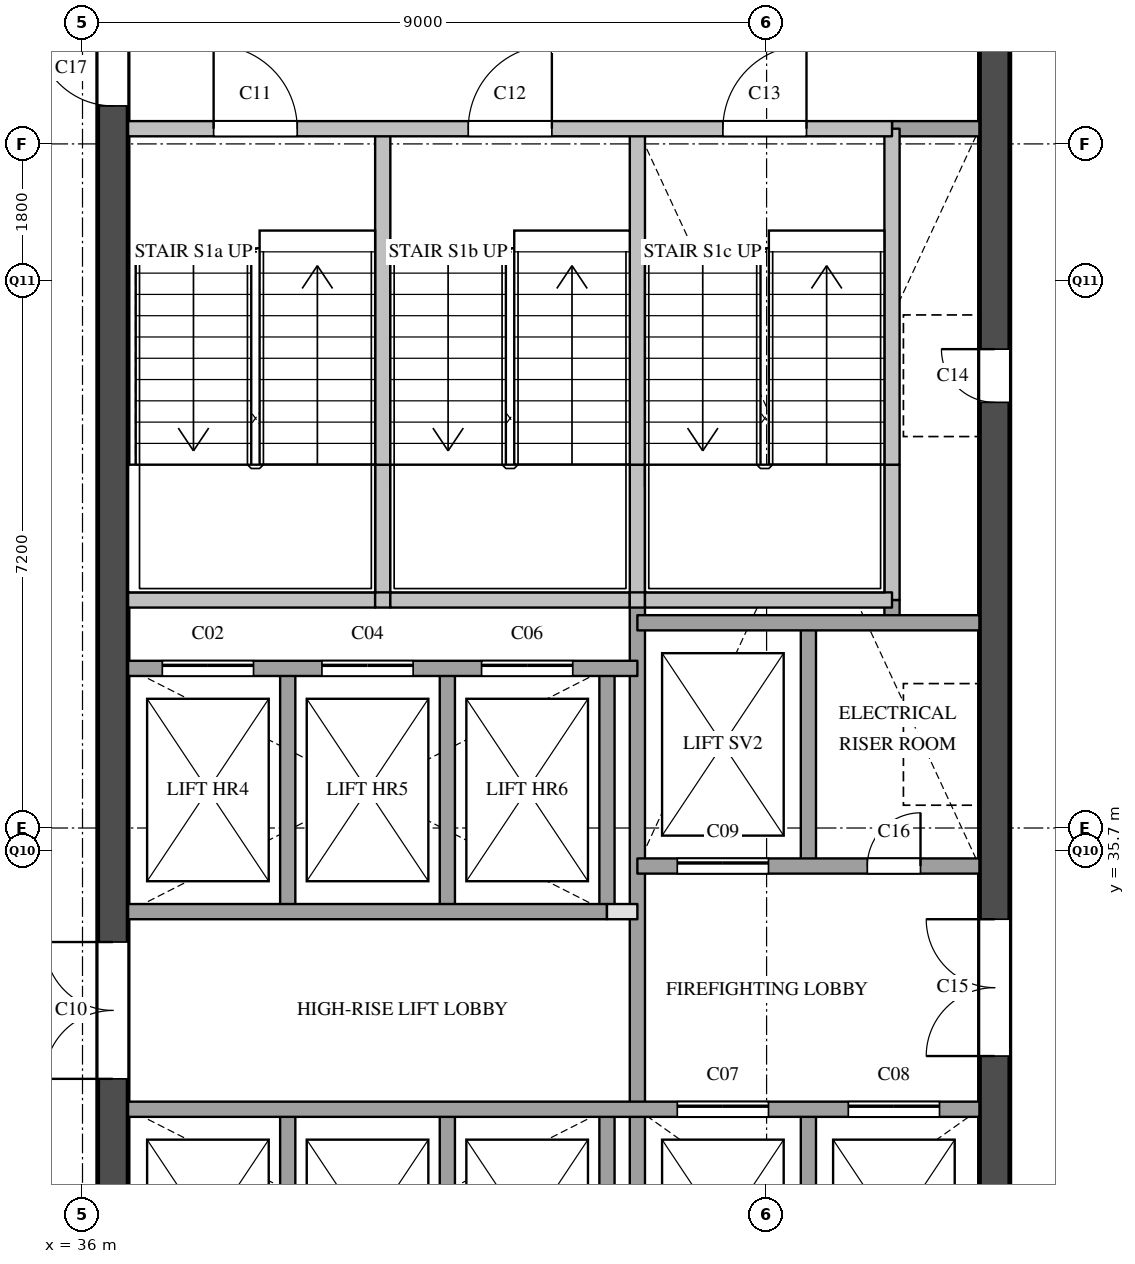
"""IFC4 building model, lengths in metres.
Left out: names, types, materials, properties, quantities, classifications, styles, units other than length and angle.
Written with IfcOpenShell. Run it as: python <this file> out.ifc"""

import sys

from ifc_helpers import new_model, si_unit, direction, frame, frame_2d, origin, place, context, subcontext, project, spatial, rectangle, extrude, element, fill, save


model = new_model("IFC4")
c1 = context("Model", 3, precision=1e-05, world=origin(), true_north=direction((0.0, 1.0)))
c2 = subcontext(c1, "Body", "Model", "MODEL_VIEW")
j1 = project(units=[si_unit("LENGTHUNIT", "METRE"), si_unit("PLANEANGLEUNIT", "RADIAN")], contexts=[c1])
p1 = place(None, origin())
s1 = spatial("IfcSite", under=j1, at=p1, CompositionType="ELEMENT")
p2 = place(p1, origin())
s2 = spatial("IfcBuilding", under=s1, at=p2, CompositionType="ELEMENT")
p3 = place(p2, frame((0.0, 0.0, 261.8)))
s3 = spatial("IfcBuildingStorey", under=s2, at=p3, CompositionType="ELEMENT", Elevation=261.8)
p4 = place(p3, frame((36.4, 29.1, 0.0), z_axis=(0.0, 0.0, 1.0), x_axis=(0.0, 1.0, 0.0)))
e1 = element("IfcWall", 1, at=p4, inside=s3, PredefinedType="SHEAR", context=c2, shape_type="SweptSolid", body=[
    extrude(rectangle(XDim=20.3, YDim=0.4, at=frame_2d((10.15, 0.0))), origin(), (0.0, 0.0, 1.0), 3.6),
])
p5 = place(p4, frame((3.6, 0.0, 0.0)))
e2 = element("IfcOpeningElement", 2, at=p5, cuts=e1, PredefinedType="OPENING", context=c2, shape_type="SweptSolid", body=[
    extrude(rectangle(XDim=1.8, YDim=2.1, at=frame_2d((0.9, 1.05))), frame((0.0, 0.21, 0.0), z_axis=(0.0, -1.0, 0.0), x_axis=(1.0, 0.0, 0.0)), (0.0, 0.0, 1.0), 0.42),
])
p6 = place(p4, frame((16.4, 0.0, 0.0)))
e3 = element("IfcOpeningElement", 3, at=p6, cuts=e1, PredefinedType="OPENING", context=c2, shape_type="SweptSolid", body=[
    extrude(rectangle(XDim=1.0, YDim=2.1, at=frame_2d((0.5, 1.05))), frame((0.0, 0.21, 0.0), z_axis=(0.0, -1.0, 0.0), x_axis=(1.0, 0.0, 0.0)), (0.0, 0.0, 1.0), 0.42),
])
p7 = place(p3, frame((48.0, 29.1, 0.0), z_axis=(0.0, 0.0, 1.0), x_axis=(0.0, 1.0, 0.0)))
e4 = element("IfcWall", 4, at=p7, inside=s3, PredefinedType="SHEAR", context=c2, shape_type="SweptSolid", body=[
    extrude(rectangle(XDim=20.3, YDim=0.4, at=frame_2d((10.15, 0.0))), origin(), (0.0, 0.0, 1.0), 3.6),
])
p8 = place(p7, frame((12.5, 0.0, 0.0)))
e5 = element("IfcOpeningElement", 5, at=p8, cuts=e4, PredefinedType="OPENING", context=c2, shape_type="SweptSolid", body=[
    extrude(rectangle(XDim=0.7, YDim=2.1, at=frame_2d((0.35, 1.05))), frame((0.0, 0.21, 0.0), z_axis=(0.0, -1.0, 0.0), x_axis=(1.0, 0.0, 0.0)), (0.0, 0.0, 1.0), 0.42),
])
p9 = place(p7, frame((3.9, 0.0, 0.0)))
e6 = element("IfcOpeningElement", 6, at=p9, cuts=e4, PredefinedType="OPENING", context=c2, shape_type="SweptSolid", body=[
    extrude(rectangle(XDim=1.8, YDim=2.1, at=frame_2d((0.9, 1.05))), frame((0.0, 0.21, 0.0), z_axis=(0.0, -1.0, 0.0), x_axis=(1.0, 0.0, 0.0)), (0.0, 0.0, 1.0), 0.42),
])
p10 = place(p3, frame((38.7, 29.1, 0.0), z_axis=(0.0, 0.0, 1.0), x_axis=(0.0, 1.0, 0.0)))
e7 = element("IfcWall", 7, at=p10, inside=s3, PredefinedType="SOLIDWALL", context=c2, shape_type="SweptSolid", body=[
    extrude(rectangle(XDim=3.2, YDim=0.2, at=frame_2d((1.6, 0.0))), origin(), (0.0, 0.0, 1.0), 3.6),
])
p11 = place(p3, frame((38.7, 34.9, 0.0), z_axis=(0.0, 0.0, 1.0), x_axis=(0.0, 1.0, 0.0)))
e8 = element("IfcWall", 8, at=p11, inside=s3, PredefinedType="SOLIDWALL", context=c2, shape_type="SweptSolid", body=[
    extrude(rectangle(XDim=3.2, YDim=0.2, at=frame_2d((1.6, 0.0))), origin(), (0.0, 0.0, 1.0), 3.6),
])
p12 = place(p3, frame((39.95, 39.0, 0.0), z_axis=(0.0, 0.0, 1.0), x_axis=(0.0, 1.0, 0.0)))
e9 = element("IfcWall", 9, at=p12, inside=s3, PredefinedType="SOLIDWALL", context=c2, shape_type="SweptSolid", body=[
    extrude(rectangle(XDim=1.78, YDim=0.2, at=frame_2d((0.89, 0.0))), origin(), (0.0, 0.0, 1.0), 3.6),
])
p13 = place(p3, frame((39.95, 40.78, 0.0), z_axis=(0.0, 0.0, 1.0), x_axis=(0.0, 1.0, 0.0)))
e10 = element("IfcWall", 10, at=p13, inside=s3, PredefinedType="SOLIDWALL", context=c2, shape_type="SweptSolid", body=[
    extrude(rectangle(XDim=4.42, YDim=0.2, at=frame_2d((2.21, 0.0))), origin(), (0.0, 0.0, 1.0), 3.6),
])
p14 = place(p3, frame((40.8, 29.1, 0.0), z_axis=(0.0, 0.0, 1.0), x_axis=(0.0, 1.0, 0.0)))
e11 = element("IfcWall", 11, at=p14, inside=s3, PredefinedType="SOLIDWALL", context=c2, shape_type="SweptSolid", body=[
    extrude(rectangle(XDim=3.2, YDim=0.2, at=frame_2d((1.6, 0.0))), origin(), (0.0, 0.0, 1.0), 3.6),
])
p15 = place(p3, frame((40.8, 34.9, 0.0), z_axis=(0.0, 0.0, 1.0), x_axis=(0.0, 1.0, 0.0)))
e12 = element("IfcWall", 12, at=p15, inside=s3, PredefinedType="SOLIDWALL", context=c2, shape_type="SweptSolid", body=[
    extrude(rectangle(XDim=3.2, YDim=0.2, at=frame_2d((1.6, 0.0))), origin(), (0.0, 0.0, 1.0), 3.6),
])
p16 = place(p3, frame((42.9, 29.1, 0.0), z_axis=(0.0, 0.0, 1.0), x_axis=(0.0, 1.0, 0.0)))
e13 = element("IfcWall", 13, at=p16, inside=s3, PredefinedType="SOLIDWALL", context=c2, shape_type="SweptSolid", body=[
    extrude(rectangle(XDim=3.2, YDim=0.2, at=frame_2d((1.6, 0.0))), origin(), (0.0, 0.0, 1.0), 3.6),
])
p17 = place(p3, frame((42.9, 34.9, 0.0), z_axis=(0.0, 0.0, 1.0), x_axis=(0.0, 1.0, 0.0)))
e14 = element("IfcWall", 14, at=p17, inside=s3, PredefinedType="SOLIDWALL", context=c2, shape_type="SweptSolid", body=[
    extrude(rectangle(XDim=3.2, YDim=0.2, at=frame_2d((1.6, 0.0))), origin(), (0.0, 0.0, 1.0), 3.6),
])
p18 = place(p3, frame((43.3, 29.1, 0.0), z_axis=(0.0, 0.0, 1.0), x_axis=(0.0, 1.0, 0.0)))
e15 = element("IfcWall", 15, at=p18, inside=s3, PredefinedType="SOLIDWALL", context=c2, shape_type="SweptSolid", body=[
    extrude(rectangle(XDim=9.9, YDim=0.2, at=frame_2d((4.95, 0.0))), origin(), (0.0, 0.0, 1.0), 3.6),
])
p19 = place(p3, frame((43.3, 39.0, 0.0), z_axis=(0.0, 0.0, 1.0), x_axis=(0.0, 1.0, 0.0)))
e16 = element("IfcWall", 16, at=p19, inside=s3, PredefinedType="SOLIDWALL", context=c2, shape_type="SweptSolid", body=[
    extrude(rectangle(XDim=1.78, YDim=0.2, at=frame_2d((0.89, 0.0))), origin(), (0.0, 0.0, 1.0), 3.6),
])
p20 = place(p3, frame((43.3, 40.78, 0.0), z_axis=(0.0, 0.0, 1.0), x_axis=(0.0, 1.0, 0.0)))
e17 = element("IfcWall", 17, at=p20, inside=s3, PredefinedType="SOLIDWALL", context=c2, shape_type="SweptSolid", body=[
    extrude(rectangle(XDim=4.42, YDim=0.2, at=frame_2d((2.21, 0.0))), origin(), (0.0, 0.0, 1.0), 3.6),
])
for number, where, z_axis, x_axis in (
    (18, (45.55, 29.1, 0.0), (0.0, 0.0, 1.0), (0.0, 1.0, 0.0)),
    (19, (45.55, 35.5, 0.0), (0.0, 0.0, 1.0), (0.0, 1.0, 0.0)),
):
    element("IfcWall", number, at=place(p3, frame(where, z_axis=z_axis, x_axis=x_axis)), inside=s3, PredefinedType="SOLIDWALL", context=c2, shape_type="SweptSolid", body=[
        extrude(rectangle(XDim=3.2, YDim=0.2, at=frame_2d((1.6, 0.0))), origin(), (0.0, 0.0, 1.0), 3.6),
    ])
p21 = place(p3, frame((46.65, 38.7, 0.0), z_axis=(0.0, 0.0, 1.0), x_axis=(0.0, 1.0, 0.0)))
e20 = element("IfcWall", 20, at=p21, inside=s3, PredefinedType="SOLIDWALL", context=c2, shape_type="SweptSolid", body=[
    extrude(rectangle(XDim=0.3, YDim=0.2, at=frame_2d((0.15, 0.0))), origin(), (0.0, 0.0, 1.0), 3.6),
])
p22 = place(p3, frame((46.65, 39.0, 0.0), z_axis=(0.0, 0.0, 1.0), x_axis=(0.0, 1.0, 0.0)))
e21 = element("IfcWall", 21, at=p22, inside=s3, PredefinedType="SOLIDWALL", context=c2, shape_type="SweptSolid", body=[
    extrude(rectangle(XDim=1.78, YDim=0.2, at=frame_2d((0.89, 0.0))), origin(), (0.0, 0.0, 1.0), 3.6),
])
p23 = place(p3, frame((46.65, 40.78, 0.0), z_axis=(0.0, 0.0, 1.0), x_axis=(0.0, 1.0, 0.0)))
e22 = element("IfcWall", 22, at=p23, inside=s3, PredefinedType="SOLIDWALL", context=c2, shape_type="SweptSolid", body=[
    extrude(rectangle(XDim=4.42, YDim=0.2, at=frame_2d((2.21, 0.0))), origin(), (0.0, 0.0, 1.0), 3.6),
])
p24 = place(p3, frame((36.6, 32.3, 0.0), z_axis=(0.0, 0.0, 1.0), x_axis=(1.0, 0.0, 0.0)))
e23 = element("IfcWall", 23, at=p24, inside=s3, PredefinedType="SOLIDWALL", context=c2, shape_type="SweptSolid", body=[
    extrude(rectangle(XDim=11.2, YDim=0.2, at=frame_2d((5.6, 0.0))), origin(), (0.0, 0.0, 1.0), 3.6),
])
p25 = place(p24, frame((7.225, 0.0, 0.0)))
e24 = element("IfcOpeningElement", 24, at=p25, cuts=e23, PredefinedType="OPENING", context=c2, shape_type="SweptSolid", body=[
    extrude(rectangle(XDim=1.2, YDim=2.1, at=frame_2d((0.6, 1.05))), frame((0.0, 0.11, 0.0), z_axis=(0.0, -1.0, 0.0), x_axis=(1.0, 0.0, 0.0)), (0.0, 0.0, 1.0), 0.22),
])
p26 = place(p24, frame((9.475, 0.0, 0.0)))
e25 = element("IfcOpeningElement", 25, at=p26, cuts=e23, PredefinedType="OPENING", context=c2, shape_type="SweptSolid", body=[
    extrude(rectangle(XDim=1.2, YDim=2.1, at=frame_2d((0.6, 1.05))), frame((0.0, 0.11, 0.0), z_axis=(0.0, -1.0, 0.0), x_axis=(1.0, 0.0, 0.0)), (0.0, 0.0, 1.0), 0.22),
])
p27 = place(p3, frame((42.9, 34.9, 0.0), z_axis=(0.0, 0.0, 1.0), x_axis=(1.0, 0.0, 0.0)))
e26 = element("IfcWall", 26, at=p27, inside=s3, PredefinedType="PARTITIONING", context=c2, shape_type="SweptSolid", body=[
    extrude(rectangle(XDim=0.4, YDim=0.2, at=frame_2d((0.2, 0.0))), origin(), (0.0, 0.0, 1.0), 3.6),
])
p28 = place(p3, frame((36.6, 34.9, 0.0), z_axis=(0.0, 0.0, 1.0), x_axis=(1.0, 0.0, 0.0)))
e27 = element("IfcWall", 27, at=p28, inside=s3, PredefinedType="SOLIDWALL", context=c2, shape_type="SweptSolid", body=[
    extrude(rectangle(XDim=6.3, YDim=0.2, at=frame_2d((3.15, 0.0))), origin(), (0.0, 0.0, 1.0), 3.6),
])
p29 = place(p3, frame((43.3, 35.5, 0.0), z_axis=(0.0, 0.0, 1.0), x_axis=(1.0, 0.0, 0.0)))
e28 = element("IfcWall", 28, at=p29, inside=s3, PredefinedType="SOLIDWALL", context=c2, shape_type="SweptSolid", body=[
    extrude(rectangle(XDim=4.5, YDim=0.2, at=frame_2d((2.25, 0.0))), origin(), (0.0, 0.0, 1.0), 3.6),
])
p30 = place(p29, frame((0.525, 0.0, 0.0)))
e29 = element("IfcOpeningElement", 29, at=p30, cuts=e28, PredefinedType="OPENING", context=c2, shape_type="SweptSolid", body=[
    extrude(rectangle(XDim=1.2, YDim=2.1, at=frame_2d((0.6, 1.05))), frame((0.0, 0.11, 0.0), z_axis=(0.0, -1.0, 0.0), x_axis=(1.0, 0.0, 0.0)), (0.0, 0.0, 1.0), 0.22),
])
p31 = place(p29, frame((3.025, 0.0, 0.0)))
e30 = element("IfcOpeningElement", 30, at=p31, cuts=e28, PredefinedType="OPENING", context=c2, shape_type="SweptSolid", body=[
    extrude(rectangle(XDim=0.7, YDim=2.1, at=frame_2d((0.35, 1.05))), frame((0.0, 0.11, 0.0), z_axis=(0.0, -1.0, 0.0), x_axis=(1.0, 0.0, 0.0)), (0.0, 0.0, 1.0), 0.22),
])
p32 = place(p3, frame((36.6, 38.1, 0.0), z_axis=(0.0, 0.0, 1.0), x_axis=(1.0, 0.0, 0.0)))
e31 = element("IfcWall", 31, at=p32, inside=s3, PredefinedType="SOLIDWALL", context=c2, shape_type="SweptSolid", body=[
    extrude(rectangle(XDim=6.7, YDim=0.2, at=frame_2d((3.35, 0.0))), origin(), (0.0, 0.0, 1.0), 3.6),
])
p33 = place(p32, frame((0.45, 0.0, 0.0)))
e32 = element("IfcOpeningElement", 32, at=p33, cuts=e31, PredefinedType="OPENING", context=c2, shape_type="SweptSolid", body=[
    extrude(rectangle(XDim=1.2, YDim=2.1, at=frame_2d((0.6, 1.05))), frame((0.0, 0.11, 0.0), z_axis=(0.0, -1.0, 0.0), x_axis=(1.0, 0.0, 0.0)), (0.0, 0.0, 1.0), 0.22),
])
p34 = place(p32, frame((2.55, 0.0, 0.0)))
e33 = element("IfcOpeningElement", 33, at=p34, cuts=e31, PredefinedType="OPENING", context=c2, shape_type="SweptSolid", body=[
    extrude(rectangle(XDim=1.2, YDim=2.1, at=frame_2d((0.6, 1.05))), frame((0.0, 0.11, 0.0), z_axis=(0.0, -1.0, 0.0), x_axis=(1.0, 0.0, 0.0)), (0.0, 0.0, 1.0), 0.22),
])
p35 = place(p32, frame((4.65, 0.0, 0.0)))
e34 = element("IfcOpeningElement", 34, at=p35, cuts=e31, PredefinedType="OPENING", context=c2, shape_type="SweptSolid", body=[
    extrude(rectangle(XDim=1.2, YDim=2.1, at=frame_2d((0.6, 1.05))), frame((0.0, 0.11, 0.0), z_axis=(0.0, -1.0, 0.0), x_axis=(1.0, 0.0, 0.0)), (0.0, 0.0, 1.0), 0.22),
])
p36 = place(p3, frame((43.3, 38.7, 0.0), z_axis=(0.0, 0.0, 1.0), x_axis=(1.0, 0.0, 0.0)))
e35 = element("IfcWall", 35, at=p36, inside=s3, PredefinedType="SOLIDWALL", context=c2, shape_type="SweptSolid", body=[
    extrude(rectangle(XDim=4.5, YDim=0.2, at=frame_2d((2.25, 0.0))), origin(), (0.0, 0.0, 1.0), 3.6),
])
p37 = place(p3, frame((36.6, 39.0, 0.0), z_axis=(0.0, 0.0, 1.0), x_axis=(1.0, 0.0, 0.0)))
e36 = element("IfcWall", 36, at=p37, inside=s3, PredefinedType="SOLIDWALL", context=c2, shape_type="SweptSolid", body=[
    extrude(rectangle(XDim=3.25, YDim=0.2, at=frame_2d((1.625, 0.0))), origin(), (0.0, 0.0, 1.0), 3.6),
])
p38 = place(p3, frame((39.85, 39.0, 0.0), z_axis=(0.0, 0.0, 1.0), x_axis=(1.0, 0.0, 0.0)))
e37 = element("IfcWall", 37, at=p38, inside=s3, PredefinedType="SOLIDWALL", context=c2, shape_type="SweptSolid", body=[
    extrude(rectangle(XDim=0.2, YDim=0.2, at=frame_2d((0.1, 0.0))), origin(), (0.0, 0.0, 1.0), 3.6),
])
p39 = place(p3, frame((40.05, 39.0, 0.0), z_axis=(0.0, 0.0, 1.0), x_axis=(1.0, 0.0, 0.0)))
e38 = element("IfcWall", 38, at=p39, inside=s3, PredefinedType="SOLIDWALL", context=c2, shape_type="SweptSolid", body=[
    extrude(rectangle(XDim=3.15, YDim=0.2, at=frame_2d((1.575, 0.0))), origin(), (0.0, 0.0, 1.0), 3.6),
])
p40 = place(p3, frame((43.2, 39.0, 0.0), z_axis=(0.0, 0.0, 1.0), x_axis=(1.0, 0.0, 0.0)))
e39 = element("IfcWall", 39, at=p40, inside=s3, PredefinedType="SOLIDWALL", context=c2, shape_type="SweptSolid", body=[
    extrude(rectangle(XDim=0.2, YDim=0.2, at=frame_2d((0.1, 0.0))), origin(), (0.0, 0.0, 1.0), 3.6),
])
p41 = place(p3, frame((43.4, 39.0, 0.0), z_axis=(0.0, 0.0, 1.0), x_axis=(1.0, 0.0, 0.0)))
e40 = element("IfcWall", 40, at=p41, inside=s3, PredefinedType="SOLIDWALL", context=c2, shape_type="SweptSolid", body=[
    extrude(rectangle(XDim=3.25, YDim=0.2, at=frame_2d((1.625, 0.0))), origin(), (0.0, 0.0, 1.0), 3.6),
])
p42 = place(p3, frame((46.65, 45.2, 0.0), z_axis=(0.0, 0.0, 1.0), x_axis=(1.0, 0.0, 0.0)))
e41 = element("IfcWall", 41, at=p42, inside=s3, PredefinedType="SOLIDWALL", context=c2, shape_type="SweptSolid", body=[
    extrude(rectangle(XDim=1.15, YDim=0.2, at=frame_2d((0.575, 0.0))), origin(), (0.0, 0.0, 1.0), 3.6),
])
p43 = place(p3, frame((36.6, 45.2, 0.0), z_axis=(0.0, 0.0, 1.0), x_axis=(1.0, 0.0, 0.0)))
e42 = element("IfcWall", 42, at=p43, inside=s3, PredefinedType="SOLIDWALL", context=c2, shape_type="SweptSolid", body=[
    extrude(rectangle(XDim=10.05, YDim=0.2, at=frame_2d((5.025, 0.0))), origin(), (0.0, 0.0, 1.0), 3.6),
])
p44 = place(p43, frame((1.125, 0.0, 0.0)))
e43 = element("IfcOpeningElement", 43, at=p44, cuts=e42, PredefinedType="OPENING", context=c2, shape_type="SweptSolid", body=[
    extrude(rectangle(XDim=1.1, YDim=2.1, at=frame_2d((0.55, 1.05))), frame((0.0, 0.11, 0.0), z_axis=(0.0, -1.0, 0.0), x_axis=(1.0, 0.0, 0.0)), (0.0, 0.0, 1.0), 0.22),
])
p45 = place(p43, frame((4.475, 0.0, 0.0)))
e44 = element("IfcOpeningElement", 44, at=p45, cuts=e42, PredefinedType="OPENING", context=c2, shape_type="SweptSolid", body=[
    extrude(rectangle(XDim=1.1, YDim=2.1, at=frame_2d((0.55, 1.05))), frame((0.0, 0.11, 0.0), z_axis=(0.0, -1.0, 0.0), x_axis=(1.0, 0.0, 0.0)), (0.0, 0.0, 1.0), 0.22),
])
p46 = place(p43, frame((7.825, 0.0, 0.0)))
e45 = element("IfcOpeningElement", 45, at=p46, cuts=e42, PredefinedType="OPENING", context=c2, shape_type="SweptSolid", body=[
    extrude(rectangle(XDim=1.1, YDim=2.1, at=frame_2d((0.55, 1.05))), frame((0.0, 0.11, 0.0), z_axis=(0.0, -1.0, 0.0), x_axis=(1.0, 0.0, 0.0)), (0.0, 0.0, 1.0), 0.22),
])
p47 = place(p33, origin())
e46 = element("IfcDoor", 46, at=p47, inside=s3, OperationType="SLIDING_TO_LEFT", PredefinedType="DOOR", context=c2, shape_type="SweptSolid", body=[
    extrude(rectangle(XDim=1.2, YDim=2.1, at=frame_2d((0.6, 1.05))), frame((0.0, 0.025, 0.0), z_axis=(0.0, -1.0, 0.0), x_axis=(1.0, 0.0, 0.0)), (0.0, 0.0, 1.0), 0.05),
])
fill(e32, e46)
p48 = place(p34, origin())
e47 = element("IfcDoor", 47, at=p48, inside=s3, OperationType="SLIDING_TO_LEFT", PredefinedType="DOOR", context=c2, shape_type="SweptSolid", body=[
    extrude(rectangle(XDim=1.2, YDim=2.1, at=frame_2d((0.6, 1.05))), frame((0.0, 0.025, 0.0), z_axis=(0.0, -1.0, 0.0), x_axis=(1.0, 0.0, 0.0)), (0.0, 0.0, 1.0), 0.05),
])
fill(e33, e47)
p49 = place(p35, origin())
e48 = element("IfcDoor", 48, at=p49, inside=s3, OperationType="SLIDING_TO_LEFT", PredefinedType="DOOR", context=c2, shape_type="SweptSolid", body=[
    extrude(rectangle(XDim=1.2, YDim=2.1, at=frame_2d((0.6, 1.05))), frame((0.0, 0.025, 0.0), z_axis=(0.0, -1.0, 0.0), x_axis=(1.0, 0.0, 0.0)), (0.0, 0.0, 1.0), 0.05),
])
fill(e34, e48)
p50 = place(p25, origin())
e49 = element("IfcDoor", 49, at=p50, inside=s3, OperationType="SLIDING_TO_LEFT", PredefinedType="DOOR", context=c2, shape_type="SweptSolid", body=[
    extrude(rectangle(XDim=1.2, YDim=2.1, at=frame_2d((0.6, 1.05))), frame((0.0, 0.025, 0.0), z_axis=(0.0, -1.0, 0.0), x_axis=(1.0, 0.0, 0.0)), (0.0, 0.0, 1.0), 0.05),
])
fill(e24, e49)
p51 = place(p26, origin())
e50 = element("IfcDoor", 50, at=p51, inside=s3, OperationType="SLIDING_TO_LEFT", PredefinedType="DOOR", context=c2, shape_type="SweptSolid", body=[
    extrude(rectangle(XDim=1.2, YDim=2.1, at=frame_2d((0.6, 1.05))), frame((0.0, 0.025, 0.0), z_axis=(0.0, -1.0, 0.0), x_axis=(1.0, 0.0, 0.0)), (0.0, 0.0, 1.0), 0.05),
])
fill(e25, e50)
p52 = place(p30, origin())
e51 = element("IfcDoor", 51, at=p52, inside=s3, OperationType="SLIDING_TO_LEFT", PredefinedType="DOOR", context=c2, shape_type="SweptSolid", body=[
    extrude(rectangle(XDim=1.2, YDim=2.1, at=frame_2d((0.6, 1.05))), frame((0.0, 0.025, 0.0), z_axis=(0.0, -1.0, 0.0), x_axis=(1.0, 0.0, 0.0)), (0.0, 0.0, 1.0), 0.05),
])
fill(e29, e51)
p53 = place(p5, origin())
e52 = element("IfcDoor", 52, at=p53, inside=s3, OperationType="DOUBLE_DOOR_SINGLE_SWING", PredefinedType="DOOR", context=c2, shape_type="SweptSolid", body=[
    extrude(rectangle(XDim=1.8, YDim=2.1, at=frame_2d((0.9, 1.05))), frame((0.0, 0.025, 0.0), z_axis=(0.0, -1.0, 0.0), x_axis=(1.0, 0.0, 0.0)), (0.0, 0.0, 1.0), 0.05),
])
fill(e2, e52)
p54 = place(p44, origin())
e53 = element("IfcDoor", 53, at=p54, inside=s3, OperationType="SINGLE_SWING_LEFT", PredefinedType="DOOR", context=c2, shape_type="SweptSolid", body=[
    extrude(rectangle(XDim=1.1, YDim=2.1, at=frame_2d((0.55, 1.05))), frame((0.0, 0.025, 0.0), z_axis=(0.0, -1.0, 0.0), x_axis=(1.0, 0.0, 0.0)), (0.0, 0.0, 1.0), 0.05),
])
fill(e43, e53)
p55 = place(p45, origin())
e54 = element("IfcDoor", 54, at=p55, inside=s3, OperationType="SINGLE_SWING_RIGHT", PredefinedType="DOOR", context=c2, shape_type="SweptSolid", body=[
    extrude(rectangle(XDim=1.1, YDim=2.1, at=frame_2d((0.55, 1.05))), frame((0.0, 0.025, 0.0), z_axis=(0.0, -1.0, 0.0), x_axis=(1.0, 0.0, 0.0)), (0.0, 0.0, 1.0), 0.05),
])
fill(e44, e54)
p56 = place(p46, origin())
e55 = element("IfcDoor", 55, at=p56, inside=s3, OperationType="SINGLE_SWING_RIGHT", PredefinedType="DOOR", context=c2, shape_type="SweptSolid", body=[
    extrude(rectangle(XDim=1.1, YDim=2.1, at=frame_2d((0.55, 1.05))), frame((0.0, 0.025, 0.0), z_axis=(0.0, -1.0, 0.0), x_axis=(1.0, 0.0, 0.0)), (0.0, 0.0, 1.0), 0.05),
])
fill(e45, e55)
p57 = place(p8, origin())
e56 = element("IfcDoor", 56, at=p57, inside=s3, OperationType="SINGLE_SWING_RIGHT", PredefinedType="DOOR", context=c2, shape_type="SweptSolid", body=[
    extrude(rectangle(XDim=0.7, YDim=2.1, at=frame_2d((0.35, 1.05))), frame((0.0, 0.025, 0.0), z_axis=(0.0, -1.0, 0.0), x_axis=(1.0, 0.0, 0.0)), (0.0, 0.0, 1.0), 0.05),
])
fill(e5, e56)
p58 = place(p9, origin())
e57 = element("IfcDoor", 57, at=p58, inside=s3, OperationType="DOUBLE_DOOR_SINGLE_SWING", PredefinedType="DOOR", context=c2, shape_type="SweptSolid", body=[
    extrude(rectangle(XDim=1.8, YDim=2.1, at=frame_2d((0.9, 1.05))), frame((0.0, 0.025, 0.0), z_axis=(0.0, -1.0, 0.0), x_axis=(1.0, 0.0, 0.0)), (0.0, 0.0, 1.0), 0.05),
])
fill(e6, e57)
p59 = place(p31, origin())
e58 = element("IfcDoor", 58, at=p59, inside=s3, OperationType="SINGLE_SWING_RIGHT", PredefinedType="DOOR", context=c2, shape_type="SweptSolid", body=[
    extrude(rectangle(XDim=0.7, YDim=2.1, at=frame_2d((0.35, 1.05))), frame((0.0, 0.025, 0.0), z_axis=(0.0, -1.0, 0.0), x_axis=(1.0, 0.0, 0.0)), (0.0, 0.0, 1.0), 0.05),
])
fill(e30, e58)
p60 = place(p6, origin())
e59 = element("IfcDoor", 59, at=p60, inside=s3, OperationType="SINGLE_SWING_RIGHT", PredefinedType="DOOR", context=c2, shape_type="SweptSolid", body=[
    extrude(rectangle(XDim=1.0, YDim=2.1, at=frame_2d((0.5, 1.05))), frame((0.0, 0.025, 0.0), z_axis=(0.0, -1.0, 0.0), x_axis=(1.0, 0.0, 0.0)), (0.0, 0.0, 1.0), 0.05),
])
fill(e3, e59)
save(model, sys.argv[1])
